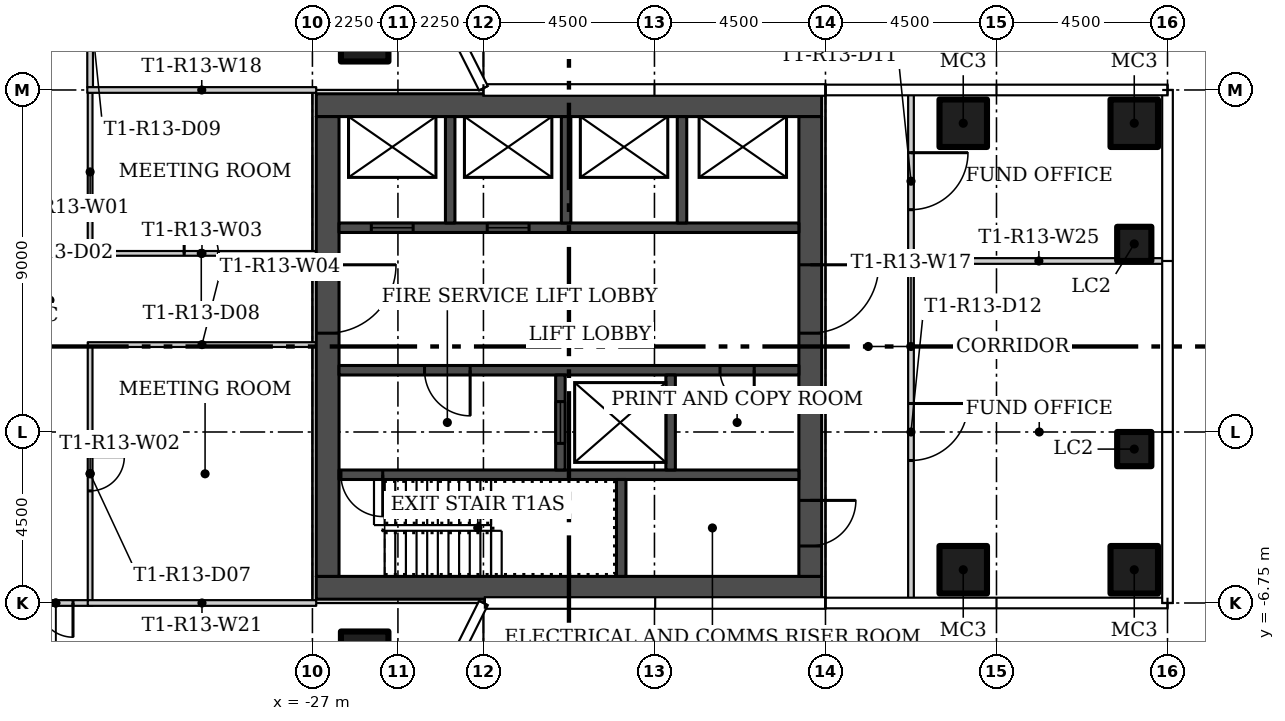
"""IFC4 building model, lengths in metres.
Left out: names, types, materials, properties, quantities, classifications, styles, units other than length and angle.
Written with IfcOpenShell. Run it as: python <this file> out.ifc"""

import sys

from ifc_helpers import new_model, si_unit, direction, frame, frame_2d, origin, origin_2d, place, context, subcontext, project, spatial, rectangle, hollow_rectangle, extrude, element, fill, save


model = new_model("IFC4")
c1 = context("Model", 3, precision=1e-05, world=origin(), true_north=direction((0.0, 1.0)))
c2 = subcontext(c1, "Body", "Model", "MODEL_VIEW")
j1 = project(units=[si_unit("LENGTHUNIT", "METRE"), si_unit("PLANEANGLEUNIT", "RADIAN")], contexts=[c1])
p1 = place(None, origin())
s1 = spatial("IfcSite", under=j1, at=p1, CompositionType="ELEMENT")
p2 = place(p1, origin())
s2 = spatial("IfcBuilding", under=s1, at=p2, CompositionType="ELEMENT")
p3 = place(p2, frame((0.0, 0.0, 124.8)))
s3 = spatial("IfcBuildingStorey", under=s2, at=p3, CompositionType="ELEMENT", Elevation=124.8)
for number, where in (
    (1, (-25.625, 8.125, 0.0)),
    (2, (-25.625, -8.125, 0.0)),
    (3, (-9.875, -5.875, 0.0)),
    (4, (-5.375, -5.875, 0.0)),
    (5, (-9.875, 5.875, 0.0)),
    (6, (-5.375, 5.875, 0.0)),
):
    element("IfcColumn", number, at=place(p3, frame(where)), inside=s3, PredefinedType="COLUMN", context=c2, shape_type="SweptSolid", body=[
        extrude(hollow_rectangle(XDim=1.25, YDim=1.25, WallThickness=0.05, at=origin_2d()), origin(), (0.0, 0.0, 1.0), 3.45),
    ])
for number, where in (
    (7, (-5.375, -2.7, 0.0)),
    (8, (-5.375, 2.7, 0.0)),
):
    element("IfcColumn", number, at=place(p3, frame(where)), inside=s3, PredefinedType="COLUMN", context=c2, shape_type="SweptSolid", body=[
        extrude(hollow_rectangle(XDim=0.9, YDim=0.9, WallThickness=0.036, at=origin_2d()), origin(), (0.0, 0.0, 1.0), 3.45),
    ])
p4 = place(p3, frame((-32.85, 6.675, 0.0), z_axis=(0.0, 0.0, 1.0), x_axis=(0.0, -1.0, 0.0)))
e9 = element("IfcWall", 9, at=p4, inside=s3, PredefinedType="PARTITIONING", context=c2, shape_type="SweptSolid", body=[
    extrude(rectangle(XDim=4.162, YDim=0.125, at=frame_2d((2.081, 0.0))), origin(), (0.0, 0.0, 1.0), 3.45),
])
p5 = place(p3, frame((-32.85, -0.013, 0.0), z_axis=(0.0, 0.0, 1.0), x_axis=(0.0, -1.0, 0.0)))
e10 = element("IfcWall", 10, at=p5, inside=s3, PredefinedType="PARTITIONING", context=c2, shape_type="SweptSolid", body=[
    extrude(rectangle(XDim=6.662, YDim=0.125, at=frame_2d((3.331, 0.0))), origin(), (0.0, 0.0, 1.0), 3.45),
])
p6 = place(p5, frame((2.887, 0.0, 0.0)))
e11 = element("IfcOpeningElement", 11, at=p6, cuts=e10, PredefinedType="OPENING", context=c2, shape_type="SweptSolid", body=[
    extrude(rectangle(XDim=0.9, YDim=2.1, at=frame_2d((0.45, 1.05))), frame((0.0, 0.073, 0.0), z_axis=(0.0, -1.0, 0.0), x_axis=(1.0, 0.0, 0.0)), (0.0, 0.0, 1.0), 0.145),
])
p7 = place(p3, frame((-32.912, 2.45, 0.0)))
e12 = element("IfcWall", 12, at=p7, inside=s3, PredefinedType="PARTITIONING", context=c2, shape_type="SweptSolid", body=[
    extrude(rectangle(XDim=6.012, YDim=0.125, at=frame_2d((3.006, 0.0))), origin(), (0.0, 0.0, 1.0), 3.45),
])
p8 = place(p7, frame((2.537, 0.0, 0.0)))
e13 = element("IfcOpeningElement", 13, at=p8, cuts=e12, PredefinedType="OPENING", context=c2, shape_type="SweptSolid", body=[
    extrude(rectangle(XDim=0.9, YDim=2.1, at=frame_2d((0.45, 1.05))), frame((0.0, 0.073, 0.0), z_axis=(0.0, -1.0, 0.0), x_axis=(1.0, 0.0, 0.0)), (0.0, 0.0, 1.0), 0.145),
])
p9 = place(p3, frame((-26.9, 0.05, 0.0), z_axis=(0.0, 0.0, 1.0), x_axis=(-1.0, 0.0, 0.0)))
e14 = element("IfcWall", 14, at=p9, inside=s3, PredefinedType="PARTITIONING", context=c2, shape_type="SweptSolid", body=[
    extrude(rectangle(XDim=6.012, YDim=0.125, at=frame_2d((3.006, 0.0))), origin(), (0.0, 0.0, 1.0), 3.45),
])
p10 = place(p3, frame((-32.85, 11.175, 0.0), z_axis=(0.0, 0.0, 1.0), x_axis=(0.0, -1.0, 0.0)))
e15 = element("IfcWall", 15, at=p10, inside=s3, PredefinedType="PARTITIONING", context=c2, shape_type="SweptSolid", body=[
    extrude(rectangle(XDim=4.35, YDim=0.15, at=frame_2d((2.175, 0.0))), origin(), (0.0, 0.0, 1.0), 3.45),
])
p11 = place(p10, frame((1.675, 0.0, 0.0)))
e16 = element("IfcOpeningElement", 16, at=p11, cuts=e15, PredefinedType="OPENING", context=c2, shape_type="SweptSolid", body=[
    extrude(rectangle(XDim=1.0, YDim=2.4, at=frame_2d((0.5, 1.2))), frame((0.0, 0.085, 0.0), z_axis=(0.0, -1.0, 0.0), x_axis=(1.0, 0.0, 0.0)), (0.0, 0.0, 1.0), 0.17),
])
p12 = place(p3, frame((-32.787, -6.75, 0.0), z_axis=(0.0, 0.0, 1.0), x_axis=(-1.0, 0.0, 0.0)))
e17 = element("IfcWall", 17, at=p12, inside=s3, PredefinedType="PARTITIONING", context=c2, shape_type="SweptSolid", body=[
    extrude(rectangle(XDim=1.938, YDim=0.15, at=frame_2d((0.969, 0.0))), origin(), (0.0, 0.0, 1.0), 3.45),
])
p13 = place(p12, frame((0.513, 0.0, 0.0)))
e18 = element("IfcOpeningElement", 18, at=p13, cuts=e17, PredefinedType="OPENING", context=c2, shape_type="SweptSolid", body=[
    extrude(rectangle(XDim=0.9, YDim=2.1, at=frame_2d((0.45, 1.05))), frame((0.0, 0.085, 0.0), z_axis=(0.0, -1.0, 0.0), x_axis=(1.0, 0.0, 0.0)), (0.0, 0.0, 1.0), 0.17),
])
p14 = place(p3, frame((-11.25, 6.655, 0.0), z_axis=(0.0, 0.0, 1.0), x_axis=(0.0, -1.0, 0.0)))
e19 = element("IfcWall", 19, at=p14, inside=s3, PredefinedType="PARTITIONING", context=c2, shape_type="SweptSolid", body=[
    extrude(rectangle(XDim=13.31, YDim=0.15, at=frame_2d((6.655, 0.0))), origin(), (0.0, 0.0, 1.0), 3.45),
])
p15 = place(p14, frame((1.555, 0.0, 0.0)))
e20 = element("IfcOpeningElement", 20, at=p15, cuts=e19, PredefinedType="OPENING", context=c2, shape_type="SweptSolid", body=[
    extrude(rectangle(XDim=1.5, YDim=2.1, at=frame_2d((0.75, 1.05))), frame((0.0, 0.085, 0.0), z_axis=(0.0, -1.0, 0.0), x_axis=(1.0, 0.0, 0.0)), (0.0, 0.0, 1.0), 0.17),
])
p16 = place(p14, frame((8.155, 0.0, 0.0)))
e21 = element("IfcOpeningElement", 21, at=p16, cuts=e19, PredefinedType="OPENING", context=c2, shape_type="SweptSolid", body=[
    extrude(rectangle(XDim=1.5, YDim=2.1, at=frame_2d((0.75, 1.05))), frame((0.0, 0.085, 0.0), z_axis=(0.0, -1.0, 0.0), x_axis=(1.0, 0.0, 0.0)), (0.0, 0.0, 1.0), 0.17),
])
p17 = place(p3, frame((-26.9, 6.75, 0.0), z_axis=(0.0, 0.0, 1.0), x_axis=(-1.0, 0.0, 0.0)))
e22 = element("IfcWall", 22, at=p17, inside=s3, PredefinedType="PARTITIONING", context=c2, shape_type="SweptSolid", body=[
    extrude(rectangle(XDim=6.025, YDim=0.15, at=frame_2d((3.012, 0.0))), origin(), (0.0, 0.0, 1.0), 3.45),
])
p18 = place(p3, frame((-32.912, -6.75, 0.0)))
e23 = element("IfcWall", 23, at=p18, inside=s3, PredefinedType="PARTITIONING", context=c2, shape_type="SweptSolid", body=[
    extrude(rectangle(XDim=6.012, YDim=0.15, at=frame_2d((3.006, 0.0))), origin(), (0.0, 0.0, 1.0), 3.45),
])
p19 = place(p3, frame((-4.595, 2.25, 0.0), z_axis=(0.0, 0.0, 1.0), x_axis=(-1.0, 0.0, 0.0)))
e24 = element("IfcWall", 24, at=p19, inside=s3, PredefinedType="PARTITIONING", context=c2, shape_type="SweptSolid", body=[
    extrude(rectangle(XDim=6.58, YDim=0.15, at=frame_2d((3.29, 0.0))), origin(), (0.0, 0.0, 1.0), 3.45),
])
for number, where in (
    (25, (-26.9, -6.35, 0.0)),
    (26, (-26.9, 6.35, 0.0)),
):
    element("IfcWall", number, at=place(p3, frame(where)), inside=s3, PredefinedType="SHEAR", context=c2, shape_type="SweptSolid", body=[
        extrude(rectangle(XDim=13.3, YDim=0.6, at=frame_2d((6.65, 0.0))), origin(), (0.0, 0.0, 1.0), 3.45),
    ])
p20 = place(p3, frame((-26.6, 6.05, 0.0), z_axis=(0.0, 0.0, 1.0), x_axis=(0.0, -1.0, 0.0)))
e27 = element("IfcWall", 27, at=p20, inside=s3, PredefinedType="SHEAR", context=c2, shape_type="SweptSolid", body=[
    extrude(rectangle(XDim=12.1, YDim=0.6, at=frame_2d((6.05, 0.0))), origin(), (0.0, 0.0, 1.0), 3.45),
])
p21 = place(p20, frame((3.9, 0.0, 0.0)))
e28 = element("IfcOpeningElement", 28, at=p21, cuts=e27, PredefinedType="OPENING", context=c2, shape_type="SweptSolid", body=[
    extrude(rectangle(XDim=1.8, YDim=2.4, at=frame_2d((0.9, 1.2))), frame((0.0, 0.31, 0.0), z_axis=(0.0, -1.0, 0.0), x_axis=(1.0, 0.0, 0.0)), (0.0, 0.0, 1.0), 0.62),
])
p22 = place(p3, frame((-13.9, 6.05, 0.0), z_axis=(0.0, 0.0, 1.0), x_axis=(0.0, -1.0, 0.0)))
e29 = element("IfcWall", 29, at=p22, inside=s3, PredefinedType="SHEAR", context=c2, shape_type="SweptSolid", body=[
    extrude(rectangle(XDim=12.1, YDim=0.6, at=frame_2d((6.05, 0.0))), origin(), (0.0, 0.0, 1.0), 3.45),
])
p23 = place(p22, frame((10.1, 0.0, 0.0)))
e30 = element("IfcOpeningElement", 30, at=p23, cuts=e29, PredefinedType="OPENING", context=c2, shape_type="SweptSolid", body=[
    extrude(rectangle(XDim=1.2, YDim=2.1, at=frame_2d((0.6, 1.05))), frame((0.0, 0.31, 0.0), z_axis=(0.0, -1.0, 0.0), x_axis=(1.0, 0.0, 0.0)), (0.0, 0.0, 1.0), 0.62),
])
p24 = place(p22, frame((3.9, 0.0, 0.0)))
e31 = element("IfcOpeningElement", 31, at=p24, cuts=e29, PredefinedType="OPENING", context=c2, shape_type="SweptSolid", body=[
    extrude(rectangle(XDim=1.8, YDim=2.4, at=frame_2d((0.9, 1.2))), frame((0.0, 0.31, 0.0), z_axis=(0.0, -1.0, 0.0), x_axis=(1.0, 0.0, 0.0)), (0.0, 0.0, 1.0), 0.62),
])
p25 = place(p3, frame((-14.2, -3.375, 0.0), z_axis=(0.0, 0.0, 1.0), x_axis=(-1.0, 0.0, 0.0)))
e32 = element("IfcWall", 32, at=p25, inside=s3, PredefinedType="SHEAR", context=c2, shape_type="SweptSolid", body=[
    extrude(rectangle(XDim=12.1, YDim=0.25, at=frame_2d((6.05, 0.0))), origin(), (0.0, 0.0, 1.0), 3.45),
])
p26 = place(p25, frame((10.95, 0.0, 0.0)))
e33 = element("IfcOpeningElement", 33, at=p26, cuts=e32, PredefinedType="OPENING", context=c2, shape_type="SweptSolid", body=[
    extrude(rectangle(XDim=1.1, YDim=2.1, at=frame_2d((0.55, 1.05))), frame((0.0, 0.135, 0.0), z_axis=(0.0, -1.0, 0.0), x_axis=(1.0, 0.0, 0.0)), (0.0, 0.0, 1.0), 0.27),
])
p27 = place(p3, frame((-18.875, -6.05, 0.0), z_axis=(0.0, 0.0, 1.0), x_axis=(0.0, 1.0, 0.0)))
e34 = element("IfcWall", 34, at=p27, inside=s3, PredefinedType="SHEAR", context=c2, shape_type="SweptSolid", body=[
    extrude(rectangle(XDim=2.55, YDim=0.25, at=frame_2d((1.275, 0.0))), origin(), (0.0, 0.0, 1.0), 3.45),
])
p28 = place(p3, frame((-14.2, -0.625, 0.0), z_axis=(0.0, 0.0, 1.0), x_axis=(-1.0, 0.0, 0.0)))
e35 = element("IfcWall", 35, at=p28, inside=s3, PredefinedType="SHEAR", context=c2, shape_type="SweptSolid", body=[
    extrude(rectangle(XDim=12.1, YDim=0.25, at=frame_2d((6.05, 0.0))), origin(), (0.0, 0.0, 1.0), 3.45),
])
p29 = place(p28, frame((8.65, 0.0, 0.0)))
e36 = element("IfcOpeningElement", 36, at=p29, cuts=e35, PredefinedType="OPENING", context=c2, shape_type="SweptSolid", body=[
    extrude(rectangle(XDim=1.2, YDim=2.1, at=frame_2d((0.6, 1.05))), frame((0.0, 0.135, 0.0), z_axis=(0.0, -1.0, 0.0), x_axis=(1.0, 0.0, 0.0)), (0.0, 0.0, 1.0), 0.27),
])
p30 = place(p28, frame((1.175, 0.0, 0.0)))
e37 = element("IfcOpeningElement", 37, at=p30, cuts=e35, PredefinedType="OPENING", context=c2, shape_type="SweptSolid", body=[
    extrude(rectangle(XDim=0.9, YDim=2.1, at=frame_2d((0.45, 1.05))), frame((0.0, 0.135, 0.0), z_axis=(0.0, -1.0, 0.0), x_axis=(1.0, 0.0, 0.0)), (0.0, 0.0, 1.0), 0.27),
])
p31 = place(p3, frame((-20.475, -3.25, 0.0), z_axis=(0.0, 0.0, 1.0), x_axis=(0.0, 1.0, 0.0)))
e38 = element("IfcWall", 38, at=p31, inside=s3, PredefinedType="SHEAR", context=c2, shape_type="SweptSolid", body=[
    extrude(rectangle(XDim=2.5, YDim=0.25, at=frame_2d((1.25, 0.0))), origin(), (0.0, 0.0, 1.0), 3.45),
])
p32 = place(p31, frame((0.7, 0.0, 0.0)))
e39 = element("IfcOpeningElement", 39, at=p32, cuts=e38, PredefinedType="OPENING", context=c2, shape_type="SweptSolid", body=[
    extrude(rectangle(XDim=1.1, YDim=2.1, at=frame_2d((0.55, 1.05))), frame((0.0, 0.135, 0.0), z_axis=(0.0, -1.0, 0.0), x_axis=(1.0, 0.0, 0.0)), (0.0, 0.0, 1.0), 0.27),
])
p33 = place(p3, frame((-17.575, -3.25, 0.0), z_axis=(0.0, 0.0, 1.0), x_axis=(0.0, 1.0, 0.0)))
e40 = element("IfcWall", 40, at=p33, inside=s3, PredefinedType="SHEAR", context=c2, shape_type="SweptSolid", body=[
    extrude(rectangle(XDim=2.5, YDim=0.25, at=frame_2d((1.25, 0.0))), origin(), (0.0, 0.0, 1.0), 3.45),
])
p34 = place(p3, frame((-26.3, 3.125, 0.0)))
e41 = element("IfcWall", 41, at=p34, inside=s3, PredefinedType="SHEAR", context=c2, shape_type="SweptSolid", body=[
    extrude(rectangle(XDim=12.1, YDim=0.25, at=frame_2d((6.05, 0.0))), origin(), (0.0, 0.0, 1.0), 3.45),
])
p35 = place(p34, frame((0.85, 0.0, 0.0)))
e42 = element("IfcOpeningElement", 42, at=p35, cuts=e41, PredefinedType="OPENING", context=c2, shape_type="SweptSolid", body=[
    extrude(rectangle(XDim=1.1, YDim=2.1, at=frame_2d((0.55, 1.05))), frame((0.0, 0.135, 0.0), z_axis=(0.0, -1.0, 0.0), x_axis=(1.0, 0.0, 0.0)), (0.0, 0.0, 1.0), 0.27),
])
p36 = place(p34, frame((3.9, 0.0, 0.0)))
e43 = element("IfcOpeningElement", 43, at=p36, cuts=e41, PredefinedType="OPENING", context=c2, shape_type="SweptSolid", body=[
    extrude(rectangle(XDim=1.1, YDim=2.1, at=frame_2d((0.55, 1.05))), frame((0.0, 0.135, 0.0), z_axis=(0.0, -1.0, 0.0), x_axis=(1.0, 0.0, 0.0)), (0.0, 0.0, 1.0), 0.27),
])
for number, where, z_axis, x_axis in (
    (44, (-23.375, 3.25, 0.0), (0.0, 0.0, 1.0), (0.0, 1.0, 0.0)),
    (45, (-20.325, 3.25, 0.0), (0.0, 0.0, 1.0), (0.0, 1.0, 0.0)),
    (46, (-17.275, 3.25, 0.0), (0.0, 0.0, 1.0), (0.0, 1.0, 0.0)),
):
    element("IfcWall", number, at=place(p3, frame(where, z_axis=z_axis, x_axis=x_axis)), inside=s3, PredefinedType="SHEAR", context=c2, shape_type="SweptSolid", body=[
        extrude(rectangle(XDim=2.8, YDim=0.25, at=frame_2d((1.4, 0.0))), origin(), (0.0, 0.0, 1.0), 3.45),
    ])
p37 = place(p13, origin())
e47 = element("IfcDoor", 47, at=p37, inside=s3, OperationType="SINGLE_SWING_RIGHT", PredefinedType="DOOR", context=c2, shape_type="SweptSolid", body=[
    extrude(rectangle(XDim=0.9, YDim=2.1, at=frame_2d((0.45, 1.05))), frame((0.0, 0.025, 0.0), z_axis=(0.0, -1.0, 0.0), x_axis=(1.0, 0.0, 0.0)), (0.0, 0.0, 1.0), 0.05),
])
fill(e18, e47)
p38 = place(p6, origin())
e48 = element("IfcDoor", 48, at=p38, inside=s3, OperationType="SINGLE_SWING_LEFT", PredefinedType="DOOR", context=c2, shape_type="SweptSolid", body=[
    extrude(rectangle(XDim=0.9, YDim=2.1, at=frame_2d((0.45, 1.05))), frame((0.0, 0.025, 0.0), z_axis=(0.0, -1.0, 0.0), x_axis=(1.0, 0.0, 0.0)), (0.0, 0.0, 1.0), 0.05),
])
fill(e11, e48)
p39 = place(p8, origin())
e49 = element("IfcDoor", 49, at=p39, inside=s3, OperationType="SINGLE_SWING_RIGHT", PredefinedType="DOOR", context=c2, shape_type="SweptSolid", body=[
    extrude(rectangle(XDim=0.9, YDim=2.1, at=frame_2d((0.45, 1.05))), frame((0.0, 0.025, 0.0), z_axis=(0.0, -1.0, 0.0), x_axis=(1.0, 0.0, 0.0)), (0.0, 0.0, 1.0), 0.05),
])
fill(e13, e49)
p40 = place(p15, origin())
e50 = element("IfcDoor", 50, at=p40, inside=s3, OperationType="DOUBLE_DOOR_SINGLE_SWING", PredefinedType="DOOR", context=c2, shape_type="SweptSolid", body=[
    extrude(rectangle(XDim=1.5, YDim=2.1, at=frame_2d((0.75, 1.05))), frame((0.0, 0.025, 0.0), z_axis=(0.0, -1.0, 0.0), x_axis=(1.0, 0.0, 0.0)), (0.0, 0.0, 1.0), 0.05),
])
fill(e20, e50)
p41 = place(p16, origin())
e51 = element("IfcDoor", 51, at=p41, inside=s3, OperationType="DOUBLE_DOOR_SINGLE_SWING", PredefinedType="DOOR", context=c2, shape_type="SweptSolid", body=[
    extrude(rectangle(XDim=1.5, YDim=2.1, at=frame_2d((0.75, 1.05))), frame((0.0, 0.025, 0.0), z_axis=(0.0, -1.0, 0.0), x_axis=(1.0, 0.0, 0.0)), (0.0, 0.0, 1.0), 0.05),
])
fill(e21, e51)
p42 = place(p21, origin())
e52 = element("IfcDoor", 52, at=p42, inside=s3, OperationType="DOUBLE_DOOR_SINGLE_SWING", PredefinedType="DOOR", context=c2, shape_type="SweptSolid", body=[
    extrude(rectangle(XDim=1.8, YDim=2.4, at=frame_2d((0.9, 1.2))), frame((0.0, 0.025, 0.0), z_axis=(0.0, -1.0, 0.0), x_axis=(1.0, 0.0, 0.0)), (0.0, 0.0, 1.0), 0.05),
])
fill(e28, e52)
p43 = place(p23, origin())
e53 = element("IfcDoor", 53, at=p43, inside=s3, OperationType="SINGLE_SWING_RIGHT", PredefinedType="DOOR", context=c2, shape_type="SweptSolid", body=[
    extrude(rectangle(XDim=1.2, YDim=2.1, at=frame_2d((0.6, 1.05))), frame((0.0, 0.025, 0.0), z_axis=(0.0, -1.0, 0.0), x_axis=(1.0, 0.0, 0.0)), (0.0, 0.0, 1.0), 0.05),
])
fill(e30, e53)
p44 = place(p24, origin())
e54 = element("IfcDoor", 54, at=p44, inside=s3, OperationType="DOUBLE_DOOR_SINGLE_SWING", PredefinedType="DOOR", context=c2, shape_type="SweptSolid", body=[
    extrude(rectangle(XDim=1.8, YDim=2.4, at=frame_2d((0.9, 1.2))), frame((0.0, 0.025, 0.0), z_axis=(0.0, -1.0, 0.0), x_axis=(1.0, 0.0, 0.0)), (0.0, 0.0, 1.0), 0.05),
])
fill(e31, e54)
p45 = place(p26, origin())
e55 = element("IfcDoor", 55, at=p45, inside=s3, OperationType="SINGLE_SWING_RIGHT", PredefinedType="DOOR", context=c2, shape_type="SweptSolid", body=[
    extrude(rectangle(XDim=1.1, YDim=2.1, at=frame_2d((0.55, 1.05))), frame((0.0, 0.025, 0.0), z_axis=(0.0, -1.0, 0.0), x_axis=(1.0, 0.0, 0.0)), (0.0, 0.0, 1.0), 0.05),
])
fill(e33, e55)
p46 = place(p29, origin())
e56 = element("IfcDoor", 56, at=p46, inside=s3, OperationType="SINGLE_SWING_RIGHT", PredefinedType="DOOR", context=c2, shape_type="SweptSolid", body=[
    extrude(rectangle(XDim=1.2, YDim=2.1, at=frame_2d((0.6, 1.05))), frame((0.0, 0.025, 0.0), z_axis=(0.0, -1.0, 0.0), x_axis=(1.0, 0.0, 0.0)), (0.0, 0.0, 1.0), 0.05),
])
fill(e36, e56)
p47 = place(p30, origin())
e57 = element("IfcDoor", 57, at=p47, inside=s3, OperationType="SINGLE_SWING_LEFT", PredefinedType="DOOR", context=c2, shape_type="SweptSolid", body=[
    extrude(rectangle(XDim=0.9, YDim=2.1, at=frame_2d((0.45, 1.05))), frame((0.0, 0.025, 0.0), z_axis=(0.0, -1.0, 0.0), x_axis=(1.0, 0.0, 0.0)), (0.0, 0.0, 1.0), 0.05),
])
fill(e37, e57)
p48 = place(p32, origin())
e58 = element("IfcDoor", 58, at=p48, inside=s3, OperationType="SLIDING_TO_LEFT", PredefinedType="DOOR", context=c2, shape_type="SweptSolid", body=[
    extrude(rectangle(XDim=1.1, YDim=2.1, at=frame_2d((0.55, 1.05))), frame((0.0, 0.025, 0.0), z_axis=(0.0, -1.0, 0.0), x_axis=(1.0, 0.0, 0.0)), (0.0, 0.0, 1.0), 0.05),
])
fill(e39, e58)
p49 = place(p35, origin())
e59 = element("IfcDoor", 59, at=p49, inside=s3, OperationType="SLIDING_TO_LEFT", PredefinedType="DOOR", context=c2, shape_type="SweptSolid", body=[
    extrude(rectangle(XDim=1.1, YDim=2.1, at=frame_2d((0.55, 1.05))), frame((0.0, 0.025, 0.0), z_axis=(0.0, -1.0, 0.0), x_axis=(1.0, 0.0, 0.0)), (0.0, 0.0, 1.0), 0.05),
])
fill(e42, e59)
p50 = place(p36, origin())
e60 = element("IfcDoor", 60, at=p50, inside=s3, OperationType="SLIDING_TO_LEFT", PredefinedType="DOOR", context=c2, shape_type="SweptSolid", body=[
    extrude(rectangle(XDim=1.1, YDim=2.1, at=frame_2d((0.55, 1.05))), frame((0.0, 0.025, 0.0), z_axis=(0.0, -1.0, 0.0), x_axis=(1.0, 0.0, 0.0)), (0.0, 0.0, 1.0), 0.05),
])
fill(e43, e60)
save(model, sys.argv[1])
